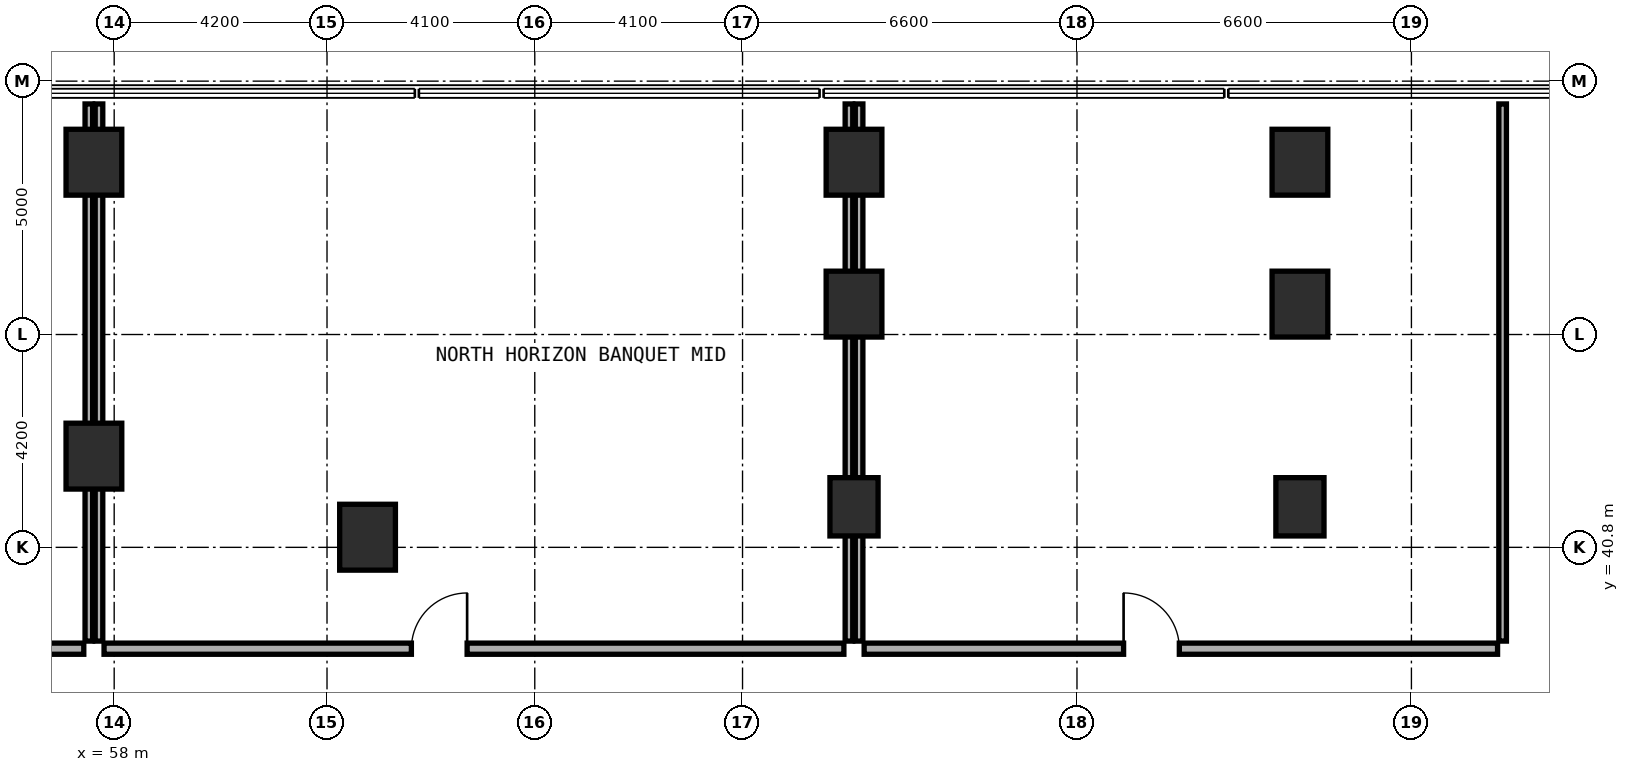
"""IFC4 building model, lengths in metres.
Left out: names, types, materials, properties, quantities, classifications, styles, units other than length and angle.
Written with IfcOpenShell. Run it as: python <this file> out.ifc"""

import sys

from ifc_helpers import new_model, si_unit, direction, frame, frame_2d, origin, origin_2d, place, context, subcontext, project, spatial, rectangle, extrude, element, fill, save


model = new_model("IFC4")
c1 = context("Model", 3, precision=1e-05, world=origin(), true_north=direction((0.0, 1.0)))
c2 = subcontext(c1, "Body", "Model", "MODEL_VIEW")
j1 = project(units=[si_unit("LENGTHUNIT", "METRE"), si_unit("PLANEANGLEUNIT", "RADIAN")], contexts=[c1])
p1 = place(None, origin())
s1 = spatial("IfcSite", under=j1, at=p1, CompositionType="ELEMENT")
p2 = place(p1, origin())
s2 = spatial("IfcBuilding", under=s1, at=p2, CompositionType="ELEMENT")
p3 = place(p2, frame((0.0, 0.0, 5.4)))
s3 = spatial("IfcBuildingStorey", under=s2, at=p3, CompositionType="ELEMENT", Elevation=5.4)
for number, where, z_axis, x_axis in (
    (1, (72.6, 41.6, 0.0), (0.0, 0.0, 1.0), (1.0, 0.0, 0.0)),
    (2, (81.4, 41.6, 0.0), (0.0, 0.0, 1.0), (1.0, 0.0, 0.0)),
):
    element("IfcColumn", number, at=place(p3, frame(where, z_axis=z_axis, x_axis=x_axis)), inside=s3, PredefinedType="COLUMN", context=c2, shape_type="SweptSolid", body=[
        extrude(rectangle(XDim=0.95, YDim=1.15, at=origin_2d()), origin(), (0.0, 0.0, 1.0), 4.8),
    ])
for number, where, z_axis, x_axis in (
    (3, (63.0, 41.0, 0.0), (0.0, 0.0, 1.0), (1.0, 0.0, 0.0)),
    (4, (57.6, 48.4, 0.0), (0.0, 0.0, 1.0), (1.0, 0.0, 0.0)),
    (5, (72.6, 48.4, 0.0), (0.0, 0.0, 1.0), (1.0, 0.0, 0.0)),
    (6, (81.4, 48.4, 0.0), (0.0, 0.0, 1.0), (1.0, 0.0, 0.0)),
    (7, (72.6, 45.6, 0.0), (0.0, 0.0, 1.0), (1.0, 0.0, 0.0)),
    (8, (81.4, 45.6, 0.0), (0.0, 0.0, 1.0), (1.0, 0.0, 0.0)),
    (9, (57.6, 42.6, 0.0), (0.0, 0.0, 1.0), (1.0, 0.0, 0.0)),
):
    element("IfcColumn", number, at=place(p3, frame(where, z_axis=z_axis, x_axis=x_axis)), inside=s3, PredefinedType="COLUMN", context=c2, shape_type="SweptSolid", body=[
        extrude(rectangle(XDim=1.1, YDim=1.3, at=origin_2d()), origin(), (0.0, 0.0, 1.0), 4.8),
    ])
p4 = place(p3, frame((57.5, 38.95, 0.0), z_axis=(0.0, 0.0, 1.0), x_axis=(0.0, 1.0, 0.0)))
e10 = element("IfcWall", 10, at=p4, inside=s3, PredefinedType="PARTITIONING", context=c2, shape_type="SweptSolid", body=[
    extrude(rectangle(XDim=10.6, YDim=0.15, at=frame_2d((5.3, 0.0))), origin(), (0.0, 0.0, 1.0), 3.625),
])
p5 = place(p3, frame((39.8, 38.8, 0.0), z_axis=(0.0, 0.0, 1.0), x_axis=(1.0, 0.0, 0.0)))
e11 = element("IfcWall", 11, at=p5, inside=s3, PredefinedType="SOLIDWALL", context=c2, shape_type="SweptSolid", body=[
    extrude(rectangle(XDim=17.6, YDim=0.22, at=frame_2d((8.8, 0.0))), origin(), (0.0, 0.0, 1.0), 3.725),
])
p6 = place(p5, frame((7.415, 0.0, 0.0)))
e12 = element("IfcOpeningElement", 12, at=p6, cuts=e11, PredefinedType="OPENING", context=c2, shape_type="SweptSolid", body=[
    extrude(rectangle(XDim=1.1, YDim=2.1, at=frame_2d((0.55, 1.05))), frame((0.0, 0.12, 0.0), z_axis=(0.0, -1.0, 0.0), x_axis=(1.0, 0.0, 0.0)), (0.0, 0.0, 1.0), 0.24),
])
p7 = place(p3, frame((57.7, 38.95, 0.0), z_axis=(0.0, 0.0, 1.0), x_axis=(0.0, 1.0, 0.0)))
e13 = element("IfcWall", 13, at=p7, inside=s3, PredefinedType="PARTITIONING", context=c2, shape_type="SweptSolid", body=[
    extrude(rectangle(XDim=10.6, YDim=0.15, at=frame_2d((5.3, 0.0))), origin(), (0.0, 0.0, 1.0), 3.725),
])
p8 = place(p3, frame((72.5, 38.95, 0.0), z_axis=(0.0, 0.0, 1.0), x_axis=(0.0, 1.0, 0.0)))
e14 = element("IfcWall", 14, at=p8, inside=s3, PredefinedType="PARTITIONING", context=c2, shape_type="SweptSolid", body=[
    extrude(rectangle(XDim=10.6, YDim=0.15, at=frame_2d((5.3, 0.0))), origin(), (0.0, 0.0, 1.0), 3.925),
])
p9 = place(p3, frame((57.8, 38.8, 0.0), z_axis=(0.0, 0.0, 1.0), x_axis=(1.0, 0.0, 0.0)))
e15 = element("IfcWall", 15, at=p9, inside=s3, PredefinedType="SOLIDWALL", context=c2, shape_type="SweptSolid", body=[
    extrude(rectangle(XDim=14.6, YDim=0.22, at=frame_2d((7.3, 0.0))), origin(), (0.0, 0.0, 1.0), 4.065),
])
p10 = place(p9, frame((6.065, 0.0, 0.0)))
e16 = element("IfcOpeningElement", 16, at=p10, cuts=e15, PredefinedType="OPENING", context=c2, shape_type="SweptSolid", body=[
    extrude(rectangle(XDim=1.1, YDim=2.1, at=frame_2d((0.55, 1.05))), frame((0.0, 0.12, 0.0), z_axis=(0.0, -1.0, 0.0), x_axis=(1.0, 0.0, 0.0)), (0.0, 0.0, 1.0), 0.24),
])
p11 = place(p3, frame((72.7, 38.95, 0.0), z_axis=(0.0, 0.0, 1.0), x_axis=(0.0, 1.0, 0.0)))
e17 = element("IfcWall", 17, at=p11, inside=s3, PredefinedType="PARTITIONING", context=c2, shape_type="SweptSolid", body=[
    extrude(rectangle(XDim=10.6, YDim=0.15, at=frame_2d((5.3, 0.0))), origin(), (0.0, 0.0, 1.0), 3.825),
])
p12 = place(p3, frame((85.4, 38.95, 0.0), z_axis=(0.0, 0.0, 1.0), x_axis=(0.0, 1.0, 0.0)))
e18 = element("IfcWall", 18, at=p12, inside=s3, PredefinedType="PARTITIONING", context=c2, shape_type="SweptSolid", body=[
    extrude(rectangle(XDim=10.6, YDim=0.15, at=frame_2d((5.3, 0.0))), origin(), (0.0, 0.0, 1.0), 3.625),
])
p13 = place(p3, frame((72.8, 38.8, 0.0), z_axis=(0.0, 0.0, 1.0), x_axis=(1.0, 0.0, 0.0)))
e19 = element("IfcWall", 19, at=p13, inside=s3, PredefinedType="SOLIDWALL", context=c2, shape_type="SweptSolid", body=[
    extrude(rectangle(XDim=12.5, YDim=0.22, at=frame_2d((6.25, 0.0))), origin(), (0.0, 0.0, 1.0), 3.925),
])
p14 = place(p13, frame((5.12, 0.0, 0.0)))
e20 = element("IfcOpeningElement", 20, at=p14, cuts=e19, PredefinedType="OPENING", context=c2, shape_type="SweptSolid", body=[
    extrude(rectangle(XDim=1.1, YDim=2.1, at=frame_2d((0.55, 1.05))), frame((0.0, 0.12, 0.0), z_axis=(0.0, -1.0, 0.0), x_axis=(1.0, 0.0, 0.0)), (0.0, 0.0, 1.0), 0.24),
])
p15 = place(p10, origin())
e21 = element("IfcDoor", 21, at=p15, inside=s3, OperationType="SINGLE_SWING_RIGHT", PredefinedType="DOOR", context=c2, shape_type="SweptSolid", body=[
    extrude(rectangle(XDim=1.1, YDim=2.1, at=frame_2d((0.55, 1.05))), frame((0.0, 0.025, 0.0), z_axis=(0.0, -1.0, 0.0), x_axis=(1.0, 0.0, 0.0)), (0.0, 0.0, 1.0), 0.05),
])
fill(e16, e21)
p16 = place(p14, origin())
e22 = element("IfcDoor", 22, at=p16, inside=s3, OperationType="SINGLE_SWING_LEFT", PredefinedType="DOOR", context=c2, shape_type="SweptSolid", body=[
    extrude(rectangle(XDim=1.1, YDim=2.1, at=frame_2d((0.55, 1.05))), frame((0.0, 0.025, 0.0), z_axis=(0.0, -1.0, 0.0), x_axis=(1.0, 0.0, 0.0)), (0.0, 0.0, 1.0), 0.05),
])
fill(e20, e22)
save(model, sys.argv[1])
